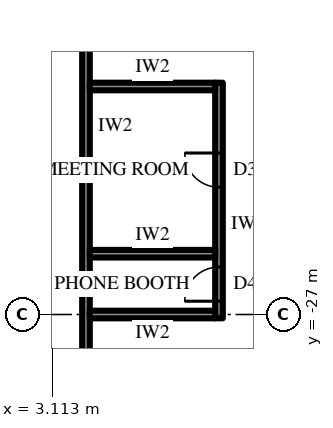
"""IFC4 building model, lengths in metres.
Left out: names, types, materials, properties, quantities, classifications, styles, units other than length and angle.
Written with IfcOpenShell. Run it as: python <this file> out.ifc"""

import sys

from ifc_helpers import new_model, si_unit, direction, frame, frame_2d, origin, place, context, subcontext, project, spatial, rectangle, extrude, element, fill, save


model = new_model("IFC4")
c1 = context("Model", 3, precision=1e-05, world=origin(), true_north=direction((0.0, 1.0)))
c2 = subcontext(c1, "Body", "Model", "MODEL_VIEW")
j1 = project(units=[si_unit("LENGTHUNIT", "METRE"), si_unit("PLANEANGLEUNIT", "RADIAN")], contexts=[c1])
p1 = place(None, origin())
s1 = spatial("IfcSite", under=j1, at=p1, CompositionType="ELEMENT")
p2 = place(p1, origin())
s2 = spatial("IfcBuilding", under=s1, at=p2, CompositionType="ELEMENT")
p3 = place(p2, frame((0.0, 0.0, 44.5)))
s3 = spatial("IfcBuildingStorey", under=s2, at=p3, CompositionType="ELEMENT", Elevation=44.5)
p4 = place(p3, frame((4.0, -14.2, 0.0), z_axis=(0.0, 0.0, 1.0), x_axis=(0.0, -1.0, 0.0)))
e1 = element("IfcWall", 1, at=p4, inside=s3, PredefinedType="PARTITIONING", context=c2, shape_type="SweptSolid", body=[
    extrude(rectangle(XDim=19.6, YDim=0.2, at=frame_2d((9.8, 0.0))), origin(), (0.0, 0.0, 1.0), 4.0),
])
p5 = place(p4, frame((1.46, 0.0, 0.0)))
e2 = element("IfcOpeningElement", 2, at=p5, cuts=e1, PredefinedType="OPENING", context=c2, shape_type="SweptSolid", body=[
    extrude(rectangle(XDim=1.0, YDim=2.2, at=frame_2d((0.5, 1.1))), frame((0.0, 0.11, 0.0), z_axis=(0.0, -1.0, 0.0), x_axis=(1.0, 0.0, 0.0)), (0.0, 0.0, 1.0), 0.22),
])
p6 = place(p3, frame((7.5, -20.9, 0.0), z_axis=(0.0, 0.0, 1.0), x_axis=(0.0, -1.0, 0.0)))
e3 = element("IfcWall", 3, at=p6, inside=s3, PredefinedType="PARTITIONING", context=c2, shape_type="SweptSolid", body=[
    extrude(rectangle(XDim=6.2, YDim=0.2, at=frame_2d((3.1, 0.0))), origin(), (0.0, 0.0, 1.0), 4.0),
])
p7 = place(p6, frame((1.85, 0.0, 0.0)))
e4 = element("IfcOpeningElement", 4, at=p7, cuts=e3, PredefinedType="OPENING", context=c2, shape_type="SweptSolid", body=[
    extrude(rectangle(XDim=0.9, YDim=2.2, at=frame_2d((0.45, 1.1))), frame((0.0, 0.11, 0.0), z_axis=(0.0, -1.0, 0.0), x_axis=(1.0, 0.0, 0.0)), (0.0, 0.0, 1.0), 0.22),
])
p8 = place(p6, frame((4.85, 0.0, 0.0)))
e5 = element("IfcOpeningElement", 5, at=p8, cuts=e3, PredefinedType="OPENING", context=c2, shape_type="SweptSolid", body=[
    extrude(rectangle(XDim=0.9, YDim=2.2, at=frame_2d((0.45, 1.1))), frame((0.0, 0.11, 0.0), z_axis=(0.0, -1.0, 0.0), x_axis=(1.0, 0.0, 0.0)), (0.0, 0.0, 1.0), 0.22),
])
for number, where, z_axis, x_axis in (
    (6, (4.1, -21.0, 0.0), (0.0, 0.0, 1.0), (1.0, 0.0, 0.0)),
    (7, (4.1, -25.4, 0.0), (0.0, 0.0, 1.0), (1.0, 0.0, 0.0)),
    (8, (4.1, -27.0, 0.0), (0.0, 0.0, 1.0), (1.0, 0.0, 0.0)),
):
    element("IfcWall", number, at=place(p3, frame(where, z_axis=z_axis, x_axis=x_axis)), inside=s3, PredefinedType="PARTITIONING", context=c2, shape_type="SweptSolid", body=[
        extrude(rectangle(XDim=3.3, YDim=0.2, at=frame_2d((1.65, 0.0))), origin(), (0.0, 0.0, 1.0), 4.0),
    ])
p9 = place(p7, frame((0.9, 0.0, 0.0), z_axis=(0.0, 0.0, 1.0), x_axis=(-1.0, 0.0, 0.0)))
e9 = element("IfcDoor", 9, at=p9, inside=s3, OperationType="SINGLE_SWING_LEFT", PredefinedType="DOOR", context=c2, shape_type="SweptSolid", body=[
    extrude(rectangle(XDim=0.9, YDim=2.2, at=frame_2d((0.45, 1.1))), frame((0.0, 0.025, 0.0), z_axis=(0.0, -1.0, 0.0), x_axis=(1.0, 0.0, 0.0)), (0.0, 0.0, 1.0), 0.05),
])
fill(e4, e9)
p10 = place(p8, frame((0.9, 0.0, 0.0), z_axis=(0.0, 0.0, 1.0), x_axis=(-1.0, 0.0, 0.0)))
e10 = element("IfcDoor", 10, at=p10, inside=s3, OperationType="SINGLE_SWING_RIGHT", PredefinedType="DOOR", context=c2, shape_type="SweptSolid", body=[
    extrude(rectangle(XDim=0.9, YDim=2.2, at=frame_2d((0.45, 1.1))), frame((0.0, 0.025, 0.0), z_axis=(0.0, -1.0, 0.0), x_axis=(1.0, 0.0, 0.0)), (0.0, 0.0, 1.0), 0.05),
])
fill(e5, e10)
save(model, sys.argv[1])
